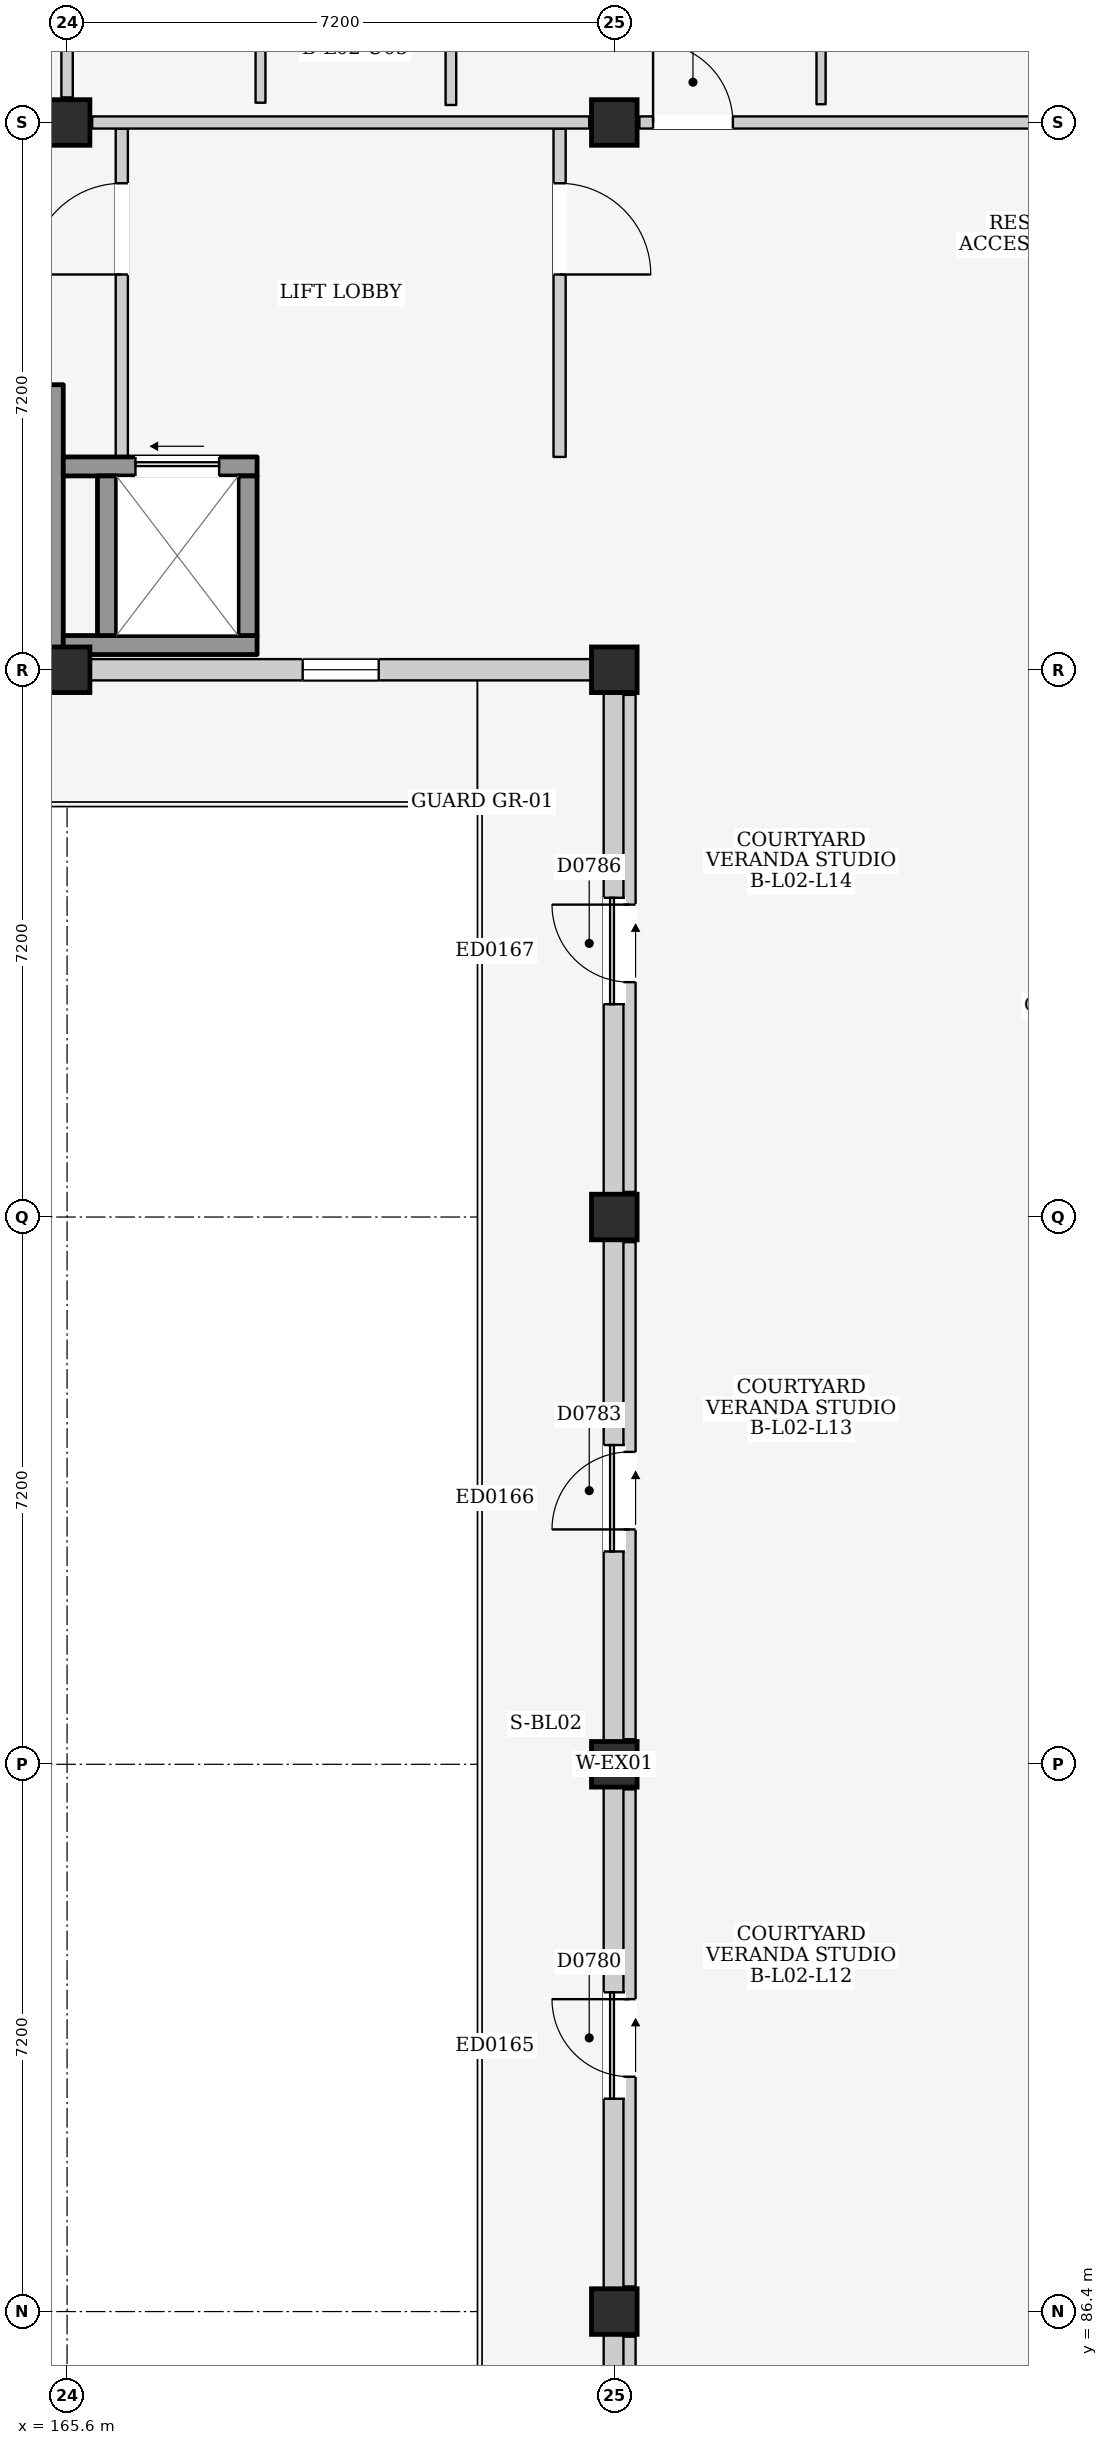
"""IFC4 building model, lengths in metres.
Left out: names, types, materials, properties, quantities, classifications, styles, units other than length and angle.
Written with IfcOpenShell. Run it as: python <this file> out.ifc"""

import sys

from ifc_helpers import new_model, si_unit, direction, frame, frame_2d, origin, origin_2d, place, context, subcontext, project, spatial, rectangle, extrude, element, fill, save


model = new_model("IFC4")
c1 = context("Model", 3, precision=1e-05, world=origin(), true_north=direction((0.0, 1.0)))
c2 = subcontext(c1, "Body", "Model", "MODEL_VIEW")
j1 = project(units=[si_unit("LENGTHUNIT", "METRE"), si_unit("PLANEANGLEUNIT", "RADIAN")], contexts=[c1])
p1 = place(None, origin())
s1 = spatial("IfcSite", under=j1, at=p1, CompositionType="ELEMENT")
p2 = place(p1, origin())
s2 = spatial("IfcBuilding", under=s1, at=p2, CompositionType="ELEMENT")
p3 = place(p2, frame((0.0, 0.0, 9.0)))
s3 = spatial("IfcBuildingStorey", under=s2, at=p3, CompositionType="ELEMENT", Elevation=9.0)
for number, where, z_axis, x_axis in (
    (1, (165.6, 108.0, 0.0), (0.0, 0.0, 1.0), (1.0, 0.0, 0.0)),
    (2, (165.6, 115.2, 0.0), (0.0, 0.0, 1.0), (1.0, 0.0, 0.0)),
    (3, (172.8, 86.4, 0.0), (0.0, 0.0, 1.0), (1.0, 0.0, 0.0)),
    (4, (172.8, 93.6, 0.0), (0.0, 0.0, 1.0), (1.0, 0.0, 0.0)),
    (5, (172.8, 100.8, 0.0), (0.0, 0.0, 1.0), (1.0, 0.0, 0.0)),
    (6, (172.8, 108.0, 0.0), (0.0, 0.0, 1.0), (1.0, 0.0, 0.0)),
    (7, (172.8, 115.2, 0.0), (0.0, 0.0, 1.0), (1.0, 0.0, 0.0)),
):
    element("IfcColumn", number, at=place(p3, frame(where, z_axis=z_axis, x_axis=x_axis)), inside=s3, PredefinedType="COLUMN", context=c2, shape_type="SweptSolid", body=[
        extrude(rectangle(XDim=0.6, YDim=0.6, at=origin_2d()), origin(), (0.0, 0.0, 1.0), 3.2),
    ])
p4 = place(p3, frame((165.9, 108.0, 0.0), z_axis=(0.0, 0.0, 1.0), x_axis=(1.0, 0.0, 0.0)))
e8 = element("IfcWall", 8, at=p4, inside=s3, PredefinedType="ELEMENTEDWALL", context=c2, shape_type="SweptSolid", body=[
    extrude(rectangle(XDim=6.6, YDim=0.28, at=frame_2d((3.3, 0.0))), origin(), (0.0, 0.0, 1.0), 2.345),
])
p5 = place(p4, frame((2.8, 0.0, 1.2)))
e9 = element("IfcOpeningElement", 9, at=p5, cuts=e8, PredefinedType="OPENING", context=c2, shape_type="SweptSolid", body=[
    extrude(rectangle(XDim=1.0, YDim=0.9, at=frame_2d((0.5, 0.45))), frame((0.0, 0.155, 0.0), z_axis=(0.0, -1.0, 0.0), x_axis=(1.0, 0.0, 0.0)), (0.0, 0.0, 1.0), 0.31),
])
p6 = place(p3, frame((172.8, 79.5, 0.0), z_axis=(0.0, 0.0, 1.0), x_axis=(0.0, 1.0, 0.0)))
e10 = element("IfcWall", 10, at=p6, inside=s3, PredefinedType="ELEMENTEDWALL", context=c2, shape_type="SweptSolid", body=[
    extrude(rectangle(XDim=6.6, YDim=0.28, at=frame_2d((3.3, 0.0))), origin(), (0.0, 0.0, 1.0), 2.395),
])
p7 = place(p6, frame((2.5, 0.0, 0.0)))
e11 = element("IfcOpeningElement", 11, at=p7, cuts=e10, PredefinedType="OPENING", context=c2, shape_type="SweptSolid", body=[
    extrude(rectangle(XDim=1.4, YDim=2.1, at=frame_2d((0.7, 1.05))), frame((0.0, 0.155, 0.0), z_axis=(0.0, -1.0, 0.0), x_axis=(1.0, 0.0, 0.0)), (0.0, 0.0, 1.0), 0.31),
])
p8 = place(p3, frame((172.8, 86.7, 0.0), z_axis=(0.0, 0.0, 1.0), x_axis=(0.0, 1.0, 0.0)))
e12 = element("IfcWall", 12, at=p8, inside=s3, PredefinedType="ELEMENTEDWALL", context=c2, shape_type="SweptSolid", body=[
    extrude(rectangle(XDim=6.6, YDim=0.28, at=frame_2d((3.3, 0.0))), origin(), (0.0, 0.0, 1.0), 2.395),
])
p9 = place(p8, frame((2.5, 0.0, 0.0)))
e13 = element("IfcOpeningElement", 13, at=p9, cuts=e12, PredefinedType="OPENING", context=c2, shape_type="SweptSolid", body=[
    extrude(rectangle(XDim=1.4, YDim=2.1, at=frame_2d((0.7, 1.05))), frame((0.0, 0.155, 0.0), z_axis=(0.0, -1.0, 0.0), x_axis=(1.0, 0.0, 0.0)), (0.0, 0.0, 1.0), 0.31),
])
p10 = place(p3, frame((172.8, 93.9, 0.0), z_axis=(0.0, 0.0, 1.0), x_axis=(0.0, 1.0, 0.0)))
e14 = element("IfcWall", 14, at=p10, inside=s3, PredefinedType="ELEMENTEDWALL", context=c2, shape_type="SweptSolid", body=[
    extrude(rectangle(XDim=6.6, YDim=0.28, at=frame_2d((3.3, 0.0))), origin(), (0.0, 0.0, 1.0), 2.395),
])
p11 = place(p10, frame((2.5, 0.0, 0.0)))
e15 = element("IfcOpeningElement", 15, at=p11, cuts=e14, PredefinedType="OPENING", context=c2, shape_type="SweptSolid", body=[
    extrude(rectangle(XDim=1.4, YDim=2.1, at=frame_2d((0.7, 1.05))), frame((0.0, 0.155, 0.0), z_axis=(0.0, -1.0, 0.0), x_axis=(1.0, 0.0, 0.0)), (0.0, 0.0, 1.0), 0.31),
])
p12 = place(p3, frame((172.8, 101.1, 0.0), z_axis=(0.0, 0.0, 1.0), x_axis=(0.0, 1.0, 0.0)))
e16 = element("IfcWall", 16, at=p12, inside=s3, PredefinedType="ELEMENTEDWALL", context=c2, shape_type="SweptSolid", body=[
    extrude(rectangle(XDim=6.6, YDim=0.28, at=frame_2d((3.3, 0.0))), origin(), (0.0, 0.0, 1.0), 2.395),
])
p13 = place(p12, frame((2.5, 0.0, 0.0)))
e17 = element("IfcOpeningElement", 17, at=p13, cuts=e16, PredefinedType="OPENING", context=c2, shape_type="SweptSolid", body=[
    extrude(rectangle(XDim=1.4, YDim=2.1, at=frame_2d((0.7, 1.05))), frame((0.0, 0.155, 0.0), z_axis=(0.0, -1.0, 0.0), x_axis=(1.0, 0.0, 0.0)), (0.0, 0.0, 1.0), 0.31),
])
p14 = place(p3, frame((165.4, 108.15, 0.0), z_axis=(0.0, 0.0, 1.0), x_axis=(0.0, 1.0, 0.0)))
e18 = element("IfcWall", 18, at=p14, inside=s3, PredefinedType="SHEAR", context=c2, shape_type="SweptSolid", body=[
    extrude(rectangle(XDim=3.6, YDim=0.3, at=frame_2d((1.8, 0.0))), origin(), (0.0, 0.0, 1.0), 2.96),
])
p15 = place(p3, frame((166.32, 110.8, 0.0), z_axis=(0.0, 0.0, 1.0), x_axis=(0.0, 1.0, 0.0)))
e19 = element("IfcWall", 19, at=p15, inside=s3, PredefinedType="PARTITIONING", context=c2, shape_type="SweptSolid", body=[
    extrude(rectangle(XDim=4.32, YDim=0.16, at=frame_2d((2.16, 0.0))), origin(), (0.0, 0.0, 1.0), 2.96),
])
p16 = place(p15, frame((2.4, 0.0, 0.0)))
e20 = element("IfcOpeningElement", 20, at=p16, cuts=e19, PredefinedType="OPENING", context=c2, shape_type="SweptSolid", body=[
    extrude(rectangle(XDim=1.2, YDim=2.2, at=frame_2d((0.6, 1.1))), frame((0.0, 0.095, 0.0), z_axis=(0.0, -1.0, 0.0), x_axis=(1.0, 0.0, 0.0)), (0.0, 0.0, 1.0), 0.19),
])
p17 = place(p3, frame((172.08, 110.8, 0.0), z_axis=(0.0, 0.0, 1.0), x_axis=(0.0, 1.0, 0.0)))
e21 = element("IfcWall", 21, at=p17, inside=s3, PredefinedType="PARTITIONING", context=c2, shape_type="SweptSolid", body=[
    extrude(rectangle(XDim=4.32, YDim=0.16, at=frame_2d((2.16, 0.0))), origin(), (0.0, 0.0, 1.0), 2.96),
])
p18 = place(p17, frame((2.4, 0.0, 0.0)))
e22 = element("IfcOpeningElement", 22, at=p18, cuts=e21, PredefinedType="OPENING", context=c2, shape_type="SweptSolid", body=[
    extrude(rectangle(XDim=1.2, YDim=2.2, at=frame_2d((0.6, 1.1))), frame((0.0, 0.095, 0.0), z_axis=(0.0, -1.0, 0.0), x_axis=(1.0, 0.0, 0.0)), (0.0, 0.0, 1.0), 0.19),
])
p19 = place(p3, frame((165.55, 108.325, 0.0), z_axis=(0.0, 0.0, 1.0), x_axis=(1.0, 0.0, 0.0)))
e23 = element("IfcWall", 23, at=p19, inside=s3, PredefinedType="SHEAR", context=c2, shape_type="SweptSolid", body=[
    extrude(rectangle(XDim=2.55, YDim=0.25, at=frame_2d((1.275, 0.0))), origin(), (0.0, 0.0, 1.0), 2.96),
])
p20 = place(p3, frame((165.55, 110.675, 0.0), z_axis=(0.0, 0.0, 1.0), x_axis=(1.0, 0.0, 0.0)))
e24 = element("IfcWall", 24, at=p20, inside=s3, PredefinedType="SHEAR", context=c2, shape_type="SweptSolid", body=[
    extrude(rectangle(XDim=2.55, YDim=0.25, at=frame_2d((1.275, 0.0))), origin(), (0.0, 0.0, 1.0), 2.96),
])
p21 = place(p20, frame((0.95, 0.0, 0.0)))
e25 = element("IfcOpeningElement", 25, at=p21, cuts=e24, PredefinedType="OPENING", context=c2, shape_type="SweptSolid", body=[
    extrude(rectangle(XDim=1.1, YDim=2.15, at=frame_2d((0.55, 1.075))), frame((0.0, 0.14, 0.0), z_axis=(0.0, -1.0, 0.0), x_axis=(1.0, 0.0, 0.0)), (0.0, 0.0, 1.0), 0.28),
])
for number, where, z_axis, x_axis in (
    (26, (166.125, 108.45, 0.0), (0.0, 0.0, 1.0), (0.0, 1.0, 0.0)),
    (27, (167.975, 108.45, 0.0), (0.0, 0.0, 1.0), (0.0, 1.0, 0.0)),
):
    element("IfcWall", number, at=place(p3, frame(where, z_axis=z_axis, x_axis=x_axis)), inside=s3, PredefinedType="SHEAR", context=c2, shape_type="SweptSolid", body=[
        extrude(rectangle(XDim=2.1, YDim=0.25, at=frame_2d((1.05, 0.0))), origin(), (0.0, 0.0, 1.0), 2.96),
    ])
p22 = place(p3, frame((165.6, 115.53, 0.0), z_axis=(0.0, 0.0, 1.0), x_axis=(0.0, 1.0, 0.0)))
e28 = element("IfcWall", 28, at=p22, inside=s3, PredefinedType="PARTITIONING", context=c2, shape_type="SweptSolid", body=[
    extrude(rectangle(XDim=6.54, YDim=0.15, at=frame_2d((3.27, 0.0))), origin(), (0.0, 0.0, 1.0), 2.395),
])
p23 = place(p3, frame((165.93, 115.2, 0.0), z_axis=(0.0, 0.0, 1.0), x_axis=(1.0, 0.0, 0.0)))
e29 = element("IfcWall", 29, at=p23, inside=s3, PredefinedType="PARTITIONING", context=c2, shape_type="SweptSolid", body=[
    extrude(rectangle(XDim=6.54, YDim=0.16, at=frame_2d((3.27, 0.0))), origin(), (0.0, 0.0, 1.0), 2.345),
])
p24 = place(p3, frame((173.13, 115.2, 0.0), z_axis=(0.0, 0.0, 1.0), x_axis=(1.0, 0.0, 0.0)))
e30 = element("IfcWall", 30, at=p24, inside=s3, PredefinedType="PARTITIONING", context=c2, shape_type="SweptSolid", body=[
    extrude(rectangle(XDim=6.54, YDim=0.16, at=frame_2d((3.27, 0.0))), origin(), (0.0, 0.0, 1.0), 2.345),
])
p25 = place(p24, frame((0.18, 0.0, 0.0)))
e31 = element("IfcOpeningElement", 31, at=p25, cuts=e30, PredefinedType="OPENING", context=c2, shape_type="SweptSolid", body=[
    extrude(rectangle(XDim=1.05, YDim=2.15, at=frame_2d((0.525, 1.075))), frame((0.0, 0.095, 0.0), z_axis=(0.0, -1.0, 0.0), x_axis=(1.0, 0.0, 0.0)), (0.0, 0.0, 1.0), 0.19),
])
p26 = place(p3, frame((168.145, 115.46, 0.0), z_axis=(0.0, 0.0, 1.0), x_axis=(0.0, 1.0, 0.0)))
e32 = element("IfcWall", 32, at=p26, inside=s3, PredefinedType="PARTITIONING", context=c2, shape_type="SweptSolid", body=[
    extrude(rectangle(XDim=3.04, YDim=0.13, at=frame_2d((1.52, 0.0))), origin(), (0.0, 0.0, 1.0), 2.96),
])
p27 = place(p3, frame((170.65, 115.43, 0.0), z_axis=(0.0, 0.0, 1.0), x_axis=(0.0, 1.0, 0.0)))
e33 = element("IfcWall", 33, at=p27, inside=s3, PredefinedType="PARTITIONING", context=c2, shape_type="SweptSolid", body=[
    extrude(rectangle(XDim=3.06, YDim=0.14, at=frame_2d((1.53, 0.0))), origin(), (0.0, 0.0, 1.0), 2.96),
])
p28 = place(p3, frame((175.52, 115.44, 0.0), z_axis=(0.0, 0.0, 1.0), x_axis=(0.0, 1.0, 0.0)))
e34 = element("IfcWall", 34, at=p28, inside=s3, PredefinedType="PARTITIONING", context=c2, shape_type="SweptSolid", body=[
    extrude(rectangle(XDim=3.04, YDim=0.12, at=frame_2d((1.52, 0.0))), origin(), (0.0, 0.0, 1.0), 2.96),
])
p29 = place(p28, frame((1.04, 0.0, 0.0)))
e35 = element("IfcOpeningElement", 35, at=p29, cuts=e34, PredefinedType="OPENING", context=c2, shape_type="SweptSolid", body=[
    extrude(rectangle(XDim=0.96, YDim=2.15, at=frame_2d((0.48, 1.075))), frame((0.0, 0.075, 0.0), z_axis=(0.0, -1.0, 0.0), x_axis=(1.0, 0.0, 0.0)), (0.0, 0.0, 1.0), 0.15),
])
p30 = place(p3, frame((173.0, 79.53, 0.0), z_axis=(0.0, 0.0, 1.0), x_axis=(0.0, 1.0, 0.0)))
e36 = element("IfcWall", 36, at=p30, inside=s3, PredefinedType="PARTITIONING", context=c2, shape_type="SweptSolid", body=[
    extrude(rectangle(XDim=6.54, YDim=0.16, at=frame_2d((3.27, 0.0))), origin(), (0.0, 0.0, 1.0), 2.395),
])
p31 = place(p30, frame((2.76, 0.0, 0.0)))
e37 = element("IfcOpeningElement", 37, at=p31, cuts=e36, PredefinedType="OPENING", context=c2, shape_type="SweptSolid", body=[
    extrude(rectangle(XDim=1.02, YDim=2.18, at=frame_2d((0.51, 1.09))), frame((0.0, 0.095, 0.0), z_axis=(0.0, -1.0, 0.0), x_axis=(1.0, 0.0, 0.0)), (0.0, 0.0, 1.0), 0.19),
])
p32 = place(p3, frame((173.0, 86.73, 0.0), z_axis=(0.0, 0.0, 1.0), x_axis=(0.0, 1.0, 0.0)))
e38 = element("IfcWall", 38, at=p32, inside=s3, PredefinedType="PARTITIONING", context=c2, shape_type="SweptSolid", body=[
    extrude(rectangle(XDim=6.54, YDim=0.16, at=frame_2d((3.27, 0.0))), origin(), (0.0, 0.0, 1.0), 2.395),
])
p33 = place(p32, frame((2.76, 0.0, 0.0)))
e39 = element("IfcOpeningElement", 39, at=p33, cuts=e38, PredefinedType="OPENING", context=c2, shape_type="SweptSolid", body=[
    extrude(rectangle(XDim=1.02, YDim=2.18, at=frame_2d((0.51, 1.09))), frame((0.0, 0.095, 0.0), z_axis=(0.0, -1.0, 0.0), x_axis=(1.0, 0.0, 0.0)), (0.0, 0.0, 1.0), 0.19),
])
p34 = place(p3, frame((173.0, 93.93, 0.0), z_axis=(0.0, 0.0, 1.0), x_axis=(0.0, 1.0, 0.0)))
e40 = element("IfcWall", 40, at=p34, inside=s3, PredefinedType="PARTITIONING", context=c2, shape_type="SweptSolid", body=[
    extrude(rectangle(XDim=6.54, YDim=0.16, at=frame_2d((3.27, 0.0))), origin(), (0.0, 0.0, 1.0), 2.395),
])
p35 = place(p34, frame((2.76, 0.0, 0.0)))
e41 = element("IfcOpeningElement", 41, at=p35, cuts=e40, PredefinedType="OPENING", context=c2, shape_type="SweptSolid", body=[
    extrude(rectangle(XDim=1.02, YDim=2.18, at=frame_2d((0.51, 1.09))), frame((0.0, 0.095, 0.0), z_axis=(0.0, -1.0, 0.0), x_axis=(1.0, 0.0, 0.0)), (0.0, 0.0, 1.0), 0.19),
])
p36 = place(p3, frame((173.0, 101.13, 0.0), z_axis=(0.0, 0.0, 1.0), x_axis=(0.0, 1.0, 0.0)))
e42 = element("IfcWall", 42, at=p36, inside=s3, PredefinedType="PARTITIONING", context=c2, shape_type="SweptSolid", body=[
    extrude(rectangle(XDim=6.54, YDim=0.16, at=frame_2d((3.27, 0.0))), origin(), (0.0, 0.0, 1.0), 2.395),
])
p37 = place(p36, frame((2.76, 0.0, 0.0)))
e43 = element("IfcOpeningElement", 43, at=p37, cuts=e42, PredefinedType="OPENING", context=c2, shape_type="SweptSolid", body=[
    extrude(rectangle(XDim=1.02, YDim=2.18, at=frame_2d((0.51, 1.09))), frame((0.0, 0.095, 0.0), z_axis=(0.0, -1.0, 0.0), x_axis=(1.0, 0.0, 0.0)), (0.0, 0.0, 1.0), 0.19),
])
p38 = place(p5, origin())
e44 = element("IfcWindow", 44, at=p38, inside=s3, PartitioningType="SINGLE_PANEL", PredefinedType="WINDOW", context=c2, shape_type="SweptSolid", body=[
    extrude(rectangle(XDim=1.0, YDim=0.9, at=frame_2d((0.5, 0.45))), frame((0.0, 0.03, 0.0), z_axis=(0.0, -1.0, 0.0), x_axis=(1.0, 0.0, 0.0)), (0.0, 0.0, 1.0), 0.06),
])
fill(e9, e44)
p39 = place(p9, frame((1.4, 0.0, 0.0), z_axis=(0.0, 0.0, 1.0), x_axis=(-1.0, 0.0, 0.0)))
e45 = element("IfcDoor", 45, at=p39, inside=s3, OperationType="SLIDING_TO_RIGHT", PredefinedType="DOOR", context=c2, shape_type="SweptSolid", body=[
    extrude(rectangle(XDim=1.4, YDim=2.1, at=frame_2d((0.7, 1.05))), frame((0.0, 0.025, 0.0), z_axis=(0.0, -1.0, 0.0), x_axis=(1.0, 0.0, 0.0)), (0.0, 0.0, 1.0), 0.05),
])
fill(e13, e45)
p40 = place(p11, frame((1.4, 0.0, 0.0), z_axis=(0.0, 0.0, 1.0), x_axis=(-1.0, 0.0, 0.0)))
e46 = element("IfcDoor", 46, at=p40, inside=s3, OperationType="SLIDING_TO_RIGHT", PredefinedType="DOOR", context=c2, shape_type="SweptSolid", body=[
    extrude(rectangle(XDim=1.4, YDim=2.1, at=frame_2d((0.7, 1.05))), frame((0.0, 0.025, 0.0), z_axis=(0.0, -1.0, 0.0), x_axis=(1.0, 0.0, 0.0)), (0.0, 0.0, 1.0), 0.05),
])
fill(e15, e46)
p41 = place(p13, frame((1.4, 0.0, 0.0), z_axis=(0.0, 0.0, 1.0), x_axis=(-1.0, 0.0, 0.0)))
e47 = element("IfcDoor", 47, at=p41, inside=s3, OperationType="SLIDING_TO_RIGHT", PredefinedType="DOOR", context=c2, shape_type="SweptSolid", body=[
    extrude(rectangle(XDim=1.4, YDim=2.1, at=frame_2d((0.7, 1.05))), frame((0.0, 0.025, 0.0), z_axis=(0.0, -1.0, 0.0), x_axis=(1.0, 0.0, 0.0)), (0.0, 0.0, 1.0), 0.05),
])
fill(e17, e47)
p42 = place(p16, origin())
e48 = element("IfcDoor", 48, at=p42, inside=s3, OperationType="SINGLE_SWING_LEFT", PredefinedType="DOOR", context=c2, shape_type="SweptSolid", body=[
    extrude(rectangle(XDim=1.2, YDim=2.2, at=frame_2d((0.6, 1.1))), frame((0.0, 0.025, 0.0), z_axis=(0.0, -1.0, 0.0), x_axis=(1.0, 0.0, 0.0)), (0.0, 0.0, 1.0), 0.05),
])
fill(e20, e48)
p43 = place(p18, frame((1.2, 0.0, 0.0), z_axis=(0.0, 0.0, 1.0), x_axis=(-1.0, 0.0, 0.0)))
e49 = element("IfcDoor", 49, at=p43, inside=s3, OperationType="SINGLE_SWING_RIGHT", PredefinedType="DOOR", context=c2, shape_type="SweptSolid", body=[
    extrude(rectangle(XDim=1.2, YDim=2.2, at=frame_2d((0.6, 1.1))), frame((0.0, 0.025, 0.0), z_axis=(0.0, -1.0, 0.0), x_axis=(1.0, 0.0, 0.0)), (0.0, 0.0, 1.0), 0.05),
])
fill(e22, e49)
p44 = place(p21, origin())
e50 = element("IfcDoor", 50, at=p44, inside=s3, OperationType="SLIDING_TO_LEFT", PredefinedType="DOOR", context=c2, shape_type="SweptSolid", body=[
    extrude(rectangle(XDim=1.1, YDim=2.15, at=frame_2d((0.55, 1.075))), frame((0.0, 0.025, 0.0), z_axis=(0.0, -1.0, 0.0), x_axis=(1.0, 0.0, 0.0)), (0.0, 0.0, 1.0), 0.05),
])
fill(e25, e50)
p45 = place(p25, origin())
e51 = element("IfcDoor", 51, at=p45, inside=s3, OperationType="SINGLE_SWING_LEFT", PredefinedType="DOOR", context=c2, shape_type="SweptSolid", body=[
    extrude(rectangle(XDim=1.05, YDim=2.15, at=frame_2d((0.525, 1.075))), frame((0.0, 0.025, 0.0), z_axis=(0.0, -1.0, 0.0), x_axis=(1.0, 0.0, 0.0)), (0.0, 0.0, 1.0), 0.05),
])
fill(e31, e51)
p46 = place(p33, origin())
e52 = element("IfcDoor", 52, at=p46, inside=s3, OperationType="SINGLE_SWING_RIGHT", PredefinedType="DOOR", context=c2, shape_type="SweptSolid", body=[
    extrude(rectangle(XDim=1.02, YDim=2.18, at=frame_2d((0.51, 1.09))), frame((0.0, 0.025, 0.0), z_axis=(0.0, -1.0, 0.0), x_axis=(1.0, 0.0, 0.0)), (0.0, 0.0, 1.0), 0.05),
])
fill(e39, e52)
p47 = place(p35, origin())
e53 = element("IfcDoor", 53, at=p47, inside=s3, OperationType="SINGLE_SWING_LEFT", PredefinedType="DOOR", context=c2, shape_type="SweptSolid", body=[
    extrude(rectangle(XDim=1.02, YDim=2.18, at=frame_2d((0.51, 1.09))), frame((0.0, 0.025, 0.0), z_axis=(0.0, -1.0, 0.0), x_axis=(1.0, 0.0, 0.0)), (0.0, 0.0, 1.0), 0.05),
])
fill(e41, e53)
p48 = place(p37, origin())
e54 = element("IfcDoor", 54, at=p48, inside=s3, OperationType="SINGLE_SWING_RIGHT", PredefinedType="DOOR", context=c2, shape_type="SweptSolid", body=[
    extrude(rectangle(XDim=1.02, YDim=2.18, at=frame_2d((0.51, 1.09))), frame((0.0, 0.025, 0.0), z_axis=(0.0, -1.0, 0.0), x_axis=(1.0, 0.0, 0.0)), (0.0, 0.0, 1.0), 0.05),
])
fill(e43, e54)
save(model, sys.argv[1])
